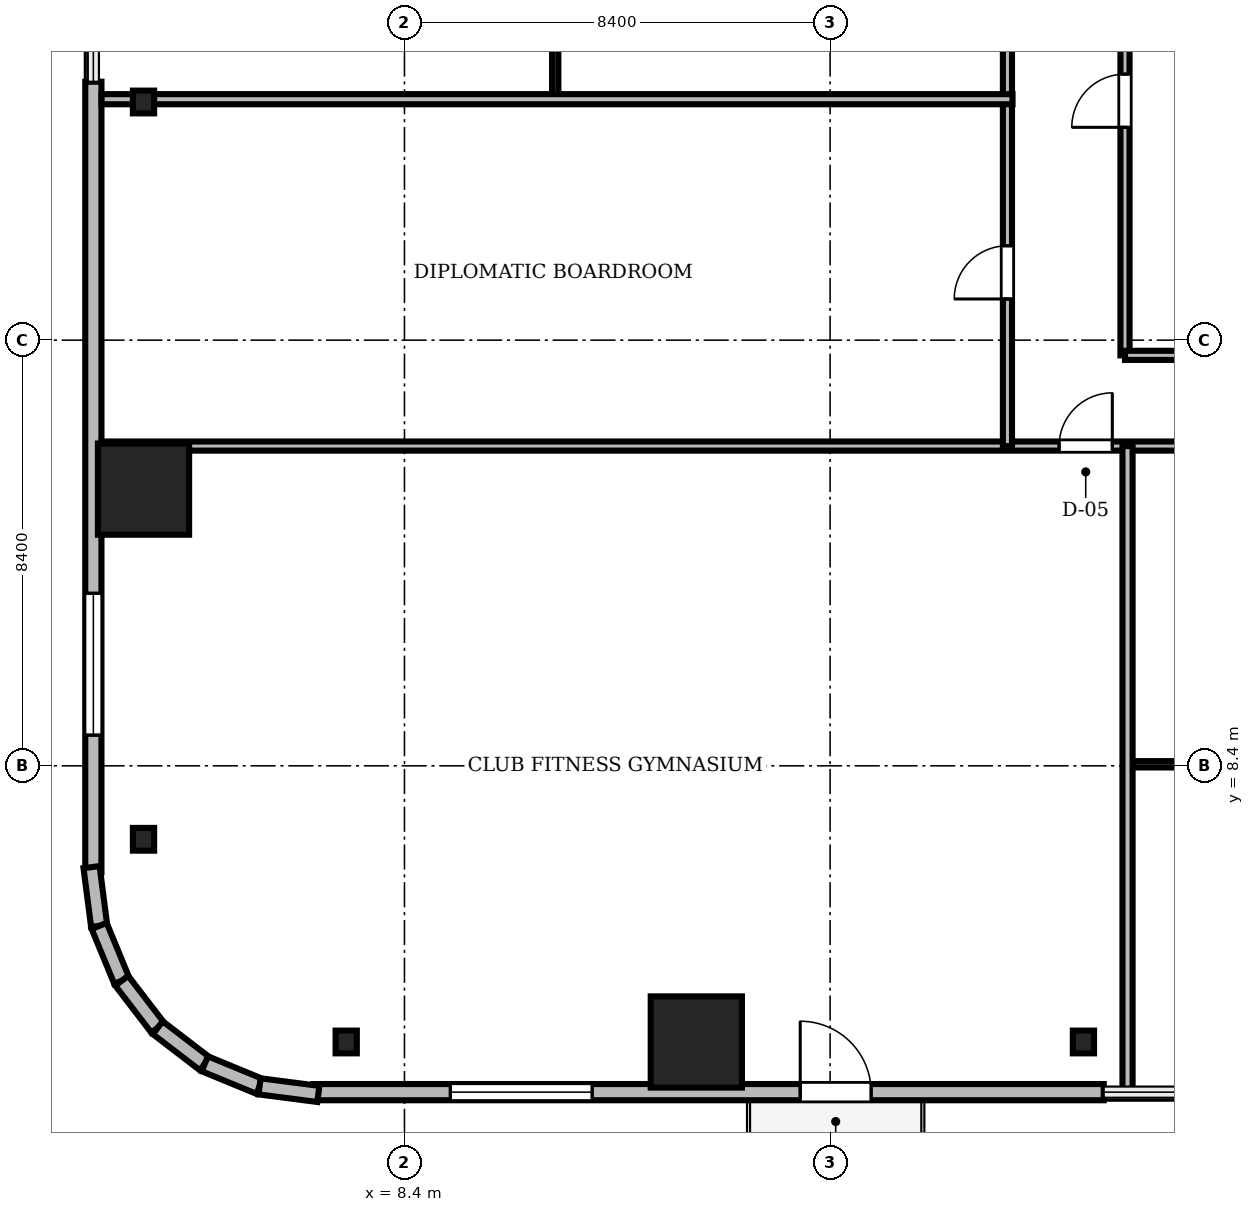
"""IFC4 building model, lengths in metres.
Left out: names, types, materials, properties, quantities, classifications, styles, units other than length and angle.
Written with IfcOpenShell. Run it as: python <this file> out.ifc"""

import sys

from ifc_helpers import new_model, si_unit, direction, frame, frame_2d, origin, origin_2d, place, context, subcontext, project, spatial, rectangle, i_section, extrude, source, transform, mapped, element, fill, save


model = new_model("IFC4")
c1 = context("Model", 3, precision=1e-05, world=origin(), true_north=direction((0.0, 1.0)))
c2 = subcontext(c1, "Body", "Model", "MODEL_VIEW")
j1 = project(units=[si_unit("LENGTHUNIT", "METRE"), si_unit("PLANEANGLEUNIT", "RADIAN")], contexts=[c1])
p1 = place(None, origin())
s1 = spatial("IfcSite", under=j1, at=p1, CompositionType="ELEMENT")
p2 = place(p1, origin())
s2 = spatial("IfcBuilding", under=s1, at=p2, CompositionType="ELEMENT")
p3 = place(p2, frame((0.0, 0.0, 71.4)))
s3 = spatial("IfcBuildingStorey", under=s2, at=p3, CompositionType="ELEMENT", Elevation=71.4)
m1 = source(origin(), c2, "Body", "SweptSolid", [
    extrude(rectangle(XDim=1.8, YDim=1.8, at=origin_2d()), origin(), (0.0, 0.0, 1.0), 3.41),
])
for number, where, z_axis, x_axis in (
    (1, (14.16, 2.95, 0.0), (0.0, 0.0, 1.0), (1.0, 0.0, 0.0)),
    (2, (3.25, 13.86, 0.0), (0.0, 0.0, 1.0), (1.0, 0.0, 0.0)),
):
    element("IfcColumn", number, at=place(p3, frame(where, z_axis=z_axis, x_axis=x_axis)), inside=s3, PredefinedType="COLUMN", context=c2, shape_type="MappedRepresentation", body=[
        mapped(m1, transform((0.0, 0.0, 0.0), scale=1.0)),
    ])
m2 = source(origin(), c2, "Body", "SweptSolid", [
    extrude(i_section(OverallWidth=0.419, OverallDepth=0.449, WebThickness=0.031, FlangeThickness=0.048, FilletRadius=0.015, at=origin_2d()), origin(), (0.0, 0.0, 1.0), 3.41),
])
for number, where, z_axis, x_axis in (
    (3, (7.25, 2.95, 0.0), (0.0, 0.0, 1.0), (1.0, 0.0, 0.0)),
    (4, (21.8, 2.95, 0.0), (0.0, 0.0, 1.0), (1.0, 0.0, 0.0)),
    (5, (3.25, 21.5, 0.0), (0.0, 0.0, 1.0), (1.0, 0.0, 0.0)),
    (6, (3.25, 6.95, 0.0), (0.0, 0.0, 1.0), (1.0, 0.0, 0.0)),
):
    element("IfcColumn", number, at=place(p3, frame(where, z_axis=z_axis, x_axis=x_axis)), inside=s3, PredefinedType="COLUMN", context=c2, shape_type="MappedRepresentation", body=[
        mapped(m2, transform((0.0, 0.0, 0.0), scale=1.0)),
    ])
m3 = source(origin(), c2, "Body", "SweptSolid", [
    extrude(rectangle(XDim=15.6, YDim=0.32, at=frame_2d((7.8, 0.0))), origin(), (0.0, 0.0, 1.0), 3.41),
])
p4 = place(p3, frame((6.6, 1.96, 0.0), z_axis=(0.0, 0.0, 1.0), x_axis=(1.0, 0.0, 0.0)))
e7 = element("IfcWall", 7, at=p4, inside=s3, PredefinedType="SOLIDWALL", context=c2, shape_type="MappedRepresentation", body=[
    mapped(m3, transform((0.0, 0.0, 0.0), scale=1.0)),
])
m4 = source(origin(), c2, "Body", "SweptSolid", [
    extrude(rectangle(XDim=1.4, YDim=2.3, at=frame_2d((0.7, 1.15))), frame((0.0, 0.17, 0.0), z_axis=(0.0, -1.0, 0.0), x_axis=(1.0, 0.0, 0.0)), (0.0, 0.0, 1.0), 0.34),
])
p5 = place(p4, frame((9.61, 0.0, 0.0)))
e8 = element("IfcOpeningElement", 8, at=p5, cuts=e7, PredefinedType="OPENING", context=c2, shape_type="MappedRepresentation", body=[
    mapped(m4, transform((0.0, 0.0, 0.0), scale=1.0)),
])
m5 = source(origin(), c2, "Body", "SweptSolid", [
    extrude(rectangle(XDim=2.8, YDim=2.4, at=frame_2d((1.4, 1.2))), frame((0.0, 0.17, 0.0), z_axis=(0.0, -1.0, 0.0), x_axis=(1.0, 0.0, 0.0)), (0.0, 0.0, 1.0), 0.34),
])
p6 = place(p4, frame((2.705, 0.0, 0.72)))
e9 = element("IfcOpeningElement", 9, at=p6, cuts=e7, PredefinedType="OPENING", context=c2, shape_type="MappedRepresentation", body=[
    mapped(m5, transform((0.0, 0.0, 0.0), scale=1.0)),
])
p7 = place(p3, frame((2.26, 21.9, 0.0), z_axis=(0.0, 0.0, 1.0), x_axis=(0.0, -1.0, 0.0)))
e10 = element("IfcWall", 10, at=p7, inside=s3, PredefinedType="SOLIDWALL", context=c2, shape_type="MappedRepresentation", body=[
    mapped(m3, transform((0.0, 0.0, 0.0), scale=1.0)),
])
p8 = place(p7, frame((10.095, 0.0, 0.72)))
e11 = element("IfcOpeningElement", 11, at=p8, cuts=e10, PredefinedType="OPENING", context=c2, shape_type="MappedRepresentation", body=[
    mapped(m5, transform((0.0, 0.0, 0.0), scale=1.0)),
])
m6 = source(origin(), c2, "Body", "SweptSolid", [
    extrude(rectangle(XDim=1.171, YDim=0.32, at=frame_2d((0.585, 0.0))), origin(), (0.0, 0.0, 1.0), 3.41),
])
p9 = place(p3, frame((2.224, 6.401, 0.0), z_axis=(0.0, 0.0, 1.0), x_axis=(0.128269133229, -0.991739395941, 0.0)))
e12 = element("IfcWall", 12, at=p9, inside=s3, PredefinedType="SOLIDWALL", context=c2, shape_type="MappedRepresentation", body=[
    mapped(m6, transform((0.0, 0.0, 0.0), scale=1.0)),
])
m7 = source(origin(), c2, "Body", "SweptSolid", [
    extrude(rectangle(XDim=1.169, YDim=0.32, at=frame_2d((0.584, 0.0))), origin(), (0.0, 0.0, 1.0), 3.41),
])
for number, where, z_axis, x_axis in (
    (13, (2.375, 5.24, 0.0), (0.0, 0.0, 1.0), (0.381, -0.925, 0.0)),
    (14, (2.82, 4.159, 0.0), (0.0, 0.0, 1.0), (0.608, -0.794, 0.0)),
):
    element("IfcWall", number, at=place(p3, frame(where, z_axis=z_axis, x_axis=x_axis)), inside=s3, PredefinedType="SOLIDWALL", context=c2, shape_type="MappedRepresentation", body=[
        mapped(m7, transform((0.0, 0.0, 0.0), scale=1.0)),
    ])
m8 = source(origin(), c2, "Body", "SweptSolid", [
    extrude(rectangle(XDim=1.169, YDim=0.32, at=frame_2d((0.584, 0.0))), origin(), (0.0, 0.0, 1.0), 3.41),
])
p10 = place(p3, frame((3.531, 3.231, 0.0), z_axis=(0.0, 0.0, 1.0), x_axis=(0.793663520347, -0.608356981114, 0.0)))
e15 = element("IfcWall", 15, at=p10, inside=s3, PredefinedType="SOLIDWALL", context=c2, shape_type="MappedRepresentation", body=[
    mapped(m8, transform((0.0, 0.0, 0.0), scale=1.0)),
])
m9 = source(origin(), c2, "Body", "SweptSolid", [
    extrude(rectangle(XDim=1.169, YDim=0.32, at=frame_2d((0.585, 0.0))), origin(), (0.0, 0.0, 1.0), 3.41),
])
p11 = place(p3, frame((4.459, 2.52, 0.0), z_axis=(0.0, 0.0, 1.0), x_axis=(0.924479075121, -0.381232789334, 0.0)))
e16 = element("IfcWall", 16, at=p11, inside=s3, PredefinedType="SOLIDWALL", context=c2, shape_type="MappedRepresentation", body=[
    mapped(m9, transform((0.0, 0.0, 0.0), scale=1.0)),
])
m10 = source(origin(), c2, "Body", "SweptSolid", [
    extrude(rectangle(XDim=1.17, YDim=0.32, at=frame_2d((0.585, 0.0))), origin(), (0.0, 0.0, 1.0), 3.41),
])
p12 = place(p3, frame((5.54, 2.074, 0.0), z_axis=(0.0, 0.0, 1.0), x_axis=(0.991762485493, -0.128090485085, 0.0)))
e17 = element("IfcWall", 17, at=p12, inside=s3, PredefinedType="SOLIDWALL", context=c2, shape_type="MappedRepresentation", body=[
    mapped(m10, transform((0.0, 0.0, 0.0), scale=1.0)),
])
m11 = source(origin(), c2, "Body", "SweptSolid", [
    extrude(rectangle(XDim=46.156, YDim=0.18, at=frame_2d((23.078, 0.0))), origin(), (0.0, 0.0, 1.0), 2.652),
])
p13 = place(p3, frame((2.422, 14.71, 0.0), z_axis=(0.0, 0.0, 1.0), x_axis=(1.0, 0.0, 0.0)))
e18 = element("IfcWall", 18, at=p13, inside=s3, PredefinedType="PARTITIONING", context=c2, shape_type="MappedRepresentation", body=[
    mapped(m11, transform((0.0, 0.0, 0.0), scale=1.0)),
])
m12 = source(origin(), c2, "Body", "SweptSolid", [
    extrude(rectangle(XDim=1.05, YDim=2.2, at=frame_2d((0.525, 1.1))), frame((0.0, 0.1, 0.0), z_axis=(0.0, -1.0, 0.0), x_axis=(1.0, 0.0, 0.0)), (0.0, 0.0, 1.0), 0.2),
])
p14 = place(p13, frame((18.898, 0.0, 0.0)))
e19 = element("IfcOpeningElement", 19, at=p14, cuts=e18, PredefinedType="OPENING", context=c2, shape_type="MappedRepresentation", body=[
    mapped(m12, transform((0.0, 0.0, 0.0), scale=1.0)),
])
p15 = place(p13, frame((22.505, 0.0, 0.0)))
e20 = element("IfcOpeningElement", 20, at=p15, cuts=e18, PredefinedType="OPENING", context=c2, shape_type="MappedRepresentation", body=[
    mapped(m12, transform((0.0, 0.0, 0.0), scale=1.0)),
])
p16 = place(p13, frame((28.058, 0.0, 0.0)))
e21 = element("IfcOpeningElement", 21, at=p16, cuts=e18, PredefinedType="OPENING", context=c2, shape_type="MappedRepresentation", body=[
    mapped(m12, transform((0.0, 0.0, 0.0), scale=1.0)),
])
p17 = place(p13, frame((33.611, 0.0, 0.0)))
e22 = element("IfcOpeningElement", 22, at=p17, cuts=e18, PredefinedType="OPENING", context=c2, shape_type="MappedRepresentation", body=[
    mapped(m12, transform((0.0, 0.0, 0.0), scale=1.0)),
])
p18 = place(p13, frame((40.998, 0.0, 0.0)))
e23 = element("IfcOpeningElement", 23, at=p18, cuts=e18, PredefinedType="OPENING", context=c2, shape_type="MappedRepresentation", body=[
    mapped(m12, transform((0.0, 0.0, 0.0), scale=1.0)),
])
m13 = source(origin(), c2, "Body", "SweptSolid", [
    extrude(rectangle(XDim=13.84, YDim=0.18, at=frame_2d((6.92, 0.0))), origin(), (0.0, 0.0, 1.0), 2.802),
])
p19 = place(p3, frame((20.3, 14.71, 0.0), z_axis=(0.0, 0.0, 1.0), x_axis=(0.0, 1.0, 0.0)))
e24 = element("IfcWall", 24, at=p19, inside=s3, PredefinedType="PARTITIONING", context=c2, shape_type="MappedRepresentation", body=[
    mapped(m13, transform((0.0, 0.0, 0.0), scale=1.0)),
])
p20 = place(p19, frame((2.903, 0.0, 0.0)))
e25 = element("IfcOpeningElement", 25, at=p20, cuts=e24, PredefinedType="OPENING", context=c2, shape_type="MappedRepresentation", body=[
    mapped(m12, transform((0.0, 0.0, 0.0), scale=1.0)),
])
p21 = place(p19, frame((9.748, 0.0, 0.0)))
e26 = element("IfcOpeningElement", 26, at=p21, cuts=e24, PredefinedType="OPENING", context=c2, shape_type="MappedRepresentation", body=[
    mapped(m12, transform((0.0, 0.0, 0.0), scale=1.0)),
])
m14 = source(origin(), c2, "Body", "SweptSolid", [
    extrude(rectangle(XDim=11.94, YDim=0.18, at=frame_2d((5.97, 0.0))), origin(), (0.0, 0.0, 1.0), 2.802),
])
p22 = place(p3, frame((22.62, 16.5, 0.0), z_axis=(0.0, 0.0, 1.0), x_axis=(0.0, 1.0, 0.0)))
e27 = element("IfcWall", 27, at=p22, inside=s3, PredefinedType="PARTITIONING", context=c2, shape_type="MappedRepresentation", body=[
    mapped(m14, transform((0.0, 0.0, 0.0), scale=1.0)),
])
p23 = place(p22, frame((4.5, 0.0, 0.0)))
e28 = element("IfcOpeningElement", 28, at=p23, cuts=e27, PredefinedType="OPENING", context=c2, shape_type="MappedRepresentation", body=[
    mapped(m12, transform((0.0, 0.0, 0.0), scale=1.0)),
])
m15 = source(origin(), c2, "Body", "SweptSolid", [
    extrude(rectangle(XDim=6.845, YDim=0.125, at=frame_2d((3.422, 0.0))), origin(), (0.0, 0.0, 1.0), 2.802),
])
p24 = place(p3, frame((11.375, 21.555, 0.0), z_axis=(0.0, 0.0, 1.0), x_axis=(0.0, 1.0, 0.0)))
e29 = element("IfcWall", 29, at=p24, inside=s3, PredefinedType="PARTITIONING", context=c2, shape_type="MappedRepresentation", body=[
    mapped(m15, transform((0.0, 0.0, 0.0), scale=1.0)),
])
m16 = source(origin(), c2, "Body", "SweptSolid", [
    extrude(rectangle(XDim=0.95, YDim=2.15, at=frame_2d((0.475, 1.075))), frame((0.0, 0.073, 0.0), z_axis=(0.0, -1.0, 0.0), x_axis=(1.0, 0.0, 0.0)), (0.0, 0.0, 1.0), 0.145),
])
p25 = place(p24, frame((2.942, 0.0, 0.0)))
e30 = element("IfcOpeningElement", 30, at=p25, cuts=e29, PredefinedType="OPENING", context=c2, shape_type="MappedRepresentation", body=[
    mapped(m16, transform((0.0, 0.0, 0.0), scale=1.0)),
])
m17 = source(origin(), c2, "Body", "SweptSolid", [
    extrude(rectangle(XDim=5.553, YDim=0.125, at=frame_2d((2.776, 0.0))), origin(), (0.0, 0.0, 1.0), 2.802),
])
p26 = place(p3, frame((22.67, 8.43, 0.0), z_axis=(0.0, 0.0, 1.0), x_axis=(1.0, 0.0, 0.0)))
e31 = element("IfcWall", 31, at=p26, inside=s3, PredefinedType="PARTITIONING", context=c2, shape_type="MappedRepresentation", body=[
    mapped(m17, transform((0.0, 0.0, 0.0), scale=1.0)),
])
p27 = place(p26, frame((2.297, 0.0, 0.0)))
e32 = element("IfcOpeningElement", 32, at=p27, cuts=e31, PredefinedType="OPENING", context=c2, shape_type="MappedRepresentation", body=[
    mapped(m16, transform((0.0, 0.0, 0.0), scale=1.0)),
])
m18 = source(origin(), c2, "Body", "SweptSolid", [
    extrude(rectangle(XDim=17.978, YDim=0.2, at=frame_2d((8.989, 0.0))), origin(), (0.0, 0.0, 1.0), 2.652),
])
p28 = place(p3, frame((2.422, 21.555, 0.0), z_axis=(0.0, 0.0, 1.0), x_axis=(1.0, 0.0, 0.0)))
e33 = element("IfcWall", 33, at=p28, inside=s3, PredefinedType="PARTITIONING", context=c2, shape_type="MappedRepresentation", body=[
    mapped(m18, transform((0.0, 0.0, 0.0), scale=1.0)),
])
m19 = source(origin(), c2, "Body", "SweptSolid", [
    extrude(rectangle(XDim=12.78, YDim=0.2, at=frame_2d((6.39, 0.0))), origin(), (0.0, 0.0, 1.0), 2.652),
])
p29 = place(p3, frame((22.67, 1.93, 0.0), z_axis=(0.0, 0.0, 1.0), x_axis=(0.0, 1.0, 0.0)))
e34 = element("IfcWall", 34, at=p29, inside=s3, PredefinedType="PARTITIONING", context=c2, shape_type="MappedRepresentation", body=[
    mapped(m19, transform((0.0, 0.0, 0.0), scale=1.0)),
])
m20 = source(origin(), c2, "Body", "SweptSolid", [
    extrude(rectangle(XDim=5.78, YDim=0.18, at=frame_2d((2.89, 0.0))), origin(), (0.0, 0.0, 1.0), 2.802),
])
p30 = place(p3, frame((22.62, 16.5, 0.0), z_axis=(0.0, 0.0, 1.0), x_axis=(1.0, 0.0, 0.0)))
e35 = element("IfcWall", 35, at=p30, inside=s3, PredefinedType="PARTITIONING", context=c2, shape_type="MappedRepresentation", body=[
    mapped(m20, transform((0.0, 0.0, 0.0), scale=1.0)),
])
m21 = source(origin(), c2, "Body", "SweptSolid", [
    extrude(rectangle(XDim=1.4, YDim=2.3, at=frame_2d((0.7, 1.15))), frame((0.0, 0.025, 0.0), z_axis=(0.0, -1.0, 0.0), x_axis=(1.0, 0.0, 0.0)), (0.0, 0.0, 1.0), 0.05),
])
p31 = place(p5, frame((1.4, 0.0, 0.0), z_axis=(0.0, 0.0, 1.0), x_axis=(-1.0, 0.0, 0.0)))
e36 = element("IfcDoor", 36, at=p31, inside=s3, OperationType="DOUBLE_DOOR_SLIDING", PredefinedType="DOOR", context=c2, shape_type="MappedRepresentation", body=[
    mapped(m21, transform((0.0, 0.0, 0.0), scale=1.0)),
])
fill(e8, e36)
m22 = source(origin(), c2, "Body", "SweptSolid", [
    extrude(rectangle(XDim=2.8, YDim=2.4, at=frame_2d((1.4, 1.2))), frame((0.0, 0.03, 0.0), z_axis=(0.0, -1.0, 0.0), x_axis=(1.0, 0.0, 0.0)), (0.0, 0.0, 1.0), 0.06),
])
p32 = place(p6, origin())
e37 = element("IfcWindow", 37, at=p32, inside=s3, PartitioningType="SINGLE_PANEL", PredefinedType="WINDOW", context=c2, shape_type="MappedRepresentation", body=[
    mapped(m22, transform((0.0, 0.0, 0.0), scale=1.0)),
])
fill(e9, e37)
p33 = place(p8, origin())
e38 = element("IfcWindow", 38, at=p33, inside=s3, PartitioningType="SINGLE_PANEL", PredefinedType="WINDOW", context=c2, shape_type="MappedRepresentation", body=[
    mapped(m22, transform((0.0, 0.0, 0.0), scale=1.0)),
])
fill(e11, e38)
m23 = source(origin(), c2, "Body", "SweptSolid", [
    extrude(rectangle(XDim=1.05, YDim=2.2, at=frame_2d((0.525, 1.1))), frame((0.0, 0.025, 0.0), z_axis=(0.0, -1.0, 0.0), x_axis=(1.0, 0.0, 0.0)), (0.0, 0.0, 1.0), 0.05),
])
p34 = place(p14, origin())
e39 = element("IfcDoor", 39, at=p34, inside=s3, OperationType="SINGLE_SWING_RIGHT", PredefinedType="DOOR", context=c2, shape_type="MappedRepresentation", body=[
    mapped(m23, transform((0.0, 0.0, 0.0), scale=1.0)),
])
fill(e19, e39)
p35 = place(p20, origin())
e40 = element("IfcDoor", 40, at=p35, inside=s3, OperationType="SINGLE_SWING_LEFT", PredefinedType="DOOR", context=c2, shape_type="MappedRepresentation", body=[
    mapped(m23, transform((0.0, 0.0, 0.0), scale=1.0)),
])
fill(e25, e40)
p36 = place(p23, origin())
e41 = element("IfcDoor", 41, at=p36, inside=s3, OperationType="SINGLE_SWING_LEFT", PredefinedType="DOOR", context=c2, shape_type="MappedRepresentation", body=[
    mapped(m23, transform((0.0, 0.0, 0.0), scale=1.0)),
])
fill(e28, e41)
save(model, sys.argv[1])
